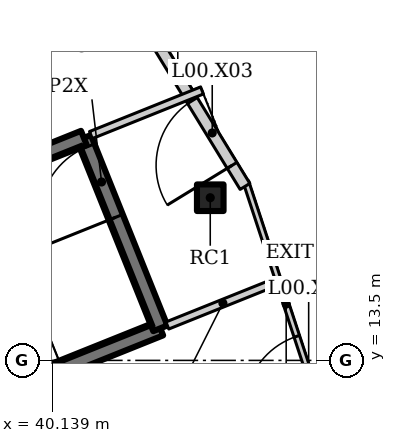
"""IFC4 building model, lengths in metres.
Left out: names, types, materials, properties, quantities, classifications, styles, units other than length and angle.
Written with IfcOpenShell. Run it as: python <this file> out.ifc"""

import sys

from ifc_helpers import new_model, si_unit, direction, frame, frame_2d, origin, origin_2d, place, context, subcontext, project, spatial, rectangle, hollow_rectangle, extrude, element, fill, save


model = new_model("IFC4")
c1 = context("Model", 3, precision=1e-05, world=origin(), true_north=direction((0.0, 1.0)))
c2 = subcontext(c1, "Body", "Model", "MODEL_VIEW")
j1 = project(units=[si_unit("LENGTHUNIT", "METRE"), si_unit("PLANEANGLEUNIT", "RADIAN")], contexts=[c1])
p1 = place(None, origin())
s1 = spatial("IfcSite", under=j1, at=p1, CompositionType="ELEMENT")
p2 = place(p1, origin())
s2 = spatial("IfcBuilding", under=s1, at=p2, CompositionType="ELEMENT")
p3 = place(p2, origin())
s3 = spatial("IfcBuildingStorey", under=s2, at=p3, CompositionType="ELEMENT", Elevation=0.0)
p4 = place(p3, frame((44.292, 17.781, 0.0), z_axis=(0.0, 0.0, 1.0), x_axis=(1.0, 0.0, 0.0)))
e1 = element("IfcColumn", 1, at=p4, inside=s3, PredefinedType="COLUMN", context=c2, shape_type="SweptSolid", body=[
    extrude(hollow_rectangle(XDim=0.7, YDim=0.7, WallThickness=0.04, at=origin_2d()), origin(), (0.0, 0.0, 1.0), 6.5),
])
p5 = place(p3, frame((47.351, 11.759, 0.0), z_axis=(0.0, 0.0, 1.0), x_axis=(-0.312642177535, 0.949870974831, 0.0)))
e2 = element("IfcWall", 2, at=p5, inside=s3, PredefinedType="ELEMENTEDWALL", context=c2, shape_type="SweptSolid", body=[
    extrude(rectangle(XDim=6.786, YDim=0.15, at=frame_2d((3.393, 0.0))), origin(), (0.0, 0.0, 1.0), 6.3),
])
p6 = place(p5, frame((0.5, 0.0, 0.0)))
e3 = element("IfcOpeningElement", 3, at=p6, cuts=e2, PredefinedType="OPENING", context=c2, shape_type="SweptSolid", body=[
    extrude(rectangle(XDim=2.0, YDim=2.4, at=frame_2d((1.0, 1.2))), frame((0.0, 0.085, 0.0), z_axis=(0.0, -1.0, 0.0), x_axis=(1.0, 0.0, 0.0)), (0.0, 0.0, 1.0), 0.17),
])
p7 = place(p3, frame((45.206, 18.078, 0.0), z_axis=(0.0, 0.0, 1.0), x_axis=(-0.52225340952, 0.852790347181, 0.0)))
e4 = element("IfcWall", 4, at=p7, inside=s3, PredefinedType="SOLIDWALL", context=c2, shape_type="SweptSolid", body=[
    extrude(rectangle(XDim=6.771, YDim=0.3, at=frame_2d((3.385, 0.0))), origin(), (0.0, 0.0, 1.0), 6.3),
])
p8 = place(p7, frame((0.65, 0.0, 0.0)))
e5 = element("IfcOpeningElement", 5, at=p8, cuts=e4, PredefinedType="OPENING", context=c2, shape_type="SweptSolid", body=[
    extrude(rectangle(XDim=2.0, YDim=2.1, at=frame_2d((1.0, 1.05))), frame((0.0, 0.16, 0.0), z_axis=(0.0, -1.0, 0.0), x_axis=(1.0, 0.0, 0.0)), (0.0, 0.0, 1.0), 0.32),
])
p9 = place(p3, frame((43.164, 14.418, 0.0), z_axis=(0.0, 0.0, 1.0), x_axis=(0.928010950087, 0.372552917744, 0.0)))
e6 = element("IfcWall", 6, at=p9, inside=s3, PredefinedType="SOLIDWALL", context=c2, shape_type="SweptSolid", body=[
    extrude(rectangle(XDim=3.15, YDim=0.2, at=frame_2d((1.575, 0.0))), origin(), (0.0, 0.0, 1.0), 6.3),
])
p10 = place(p3, frame((41.152, 19.43, 0.0), z_axis=(0.0, 0.0, 1.0), x_axis=(0.928037743531, 0.372486169652, 0.0)))
e7 = element("IfcWall", 7, at=p10, inside=s3, PredefinedType="SOLIDWALL", context=c2, shape_type="SweptSolid", body=[
    extrude(rectangle(XDim=3.15, YDim=0.2, at=frame_2d((1.575, 0.0))), origin(), (0.0, 0.0, 1.0), 6.3),
])
p11 = place(p3, frame((34.812, 11.065, 0.0), z_axis=(0.0, 0.0, 1.0), x_axis=(0.92801678004, 0.372538395288, 0.0)))
e8 = element("IfcWall", 8, at=p11, inside=s3, PredefinedType="SHEAR", context=c2, shape_type="SweptSolid", body=[
    extrude(rectangle(XDim=8.8, YDim=0.4, at=frame_2d((4.4, 0.0))), origin(), (0.0, 0.0, 1.0), 6.5),
])
p12 = place(p3, frame((42.978, 14.344, 0.0), z_axis=(0.0, 0.0, 1.0), x_axis=(-0.372544066459, 0.928014503414, 0.0)))
e9 = element("IfcWall", 9, at=p12, inside=s3, PredefinedType="SHEAR", context=c2, shape_type="SweptSolid", body=[
    extrude(rectangle(XDim=5.4, YDim=0.4, at=frame_2d((2.7, 0.0))), origin(), (0.0, 0.0, 1.0), 6.5),
])
p13 = place(p12, frame((3.15, 0.0, 0.0)))
e10 = element("IfcOpeningElement", 10, at=p13, cuts=e9, PredefinedType="OPENING", context=c2, shape_type="SweptSolid", body=[
    extrude(rectangle(XDim=2.0, YDim=2.1, at=frame_2d((1.0, 1.05))), frame((0.0, 0.21, 0.0), z_axis=(0.0, -1.0, 0.0), x_axis=(1.0, 0.0, 0.0)), (0.0, 0.0, 1.0), 0.42),
])
p14 = place(p3, frame((40.967, 19.355, 0.0), z_axis=(0.0, 0.0, 1.0), x_axis=(-0.92801678004, -0.372538395288, 0.0)))
e11 = element("IfcWall", 11, at=p14, inside=s3, PredefinedType="SHEAR", context=c2, shape_type="SweptSolid", body=[
    extrude(rectangle(XDim=8.8, YDim=0.4, at=frame_2d((4.4, 0.0))), origin(), (0.0, 0.0, 1.0), 6.5),
])
p15 = place(p6, origin())
e12 = element("IfcDoor", 12, at=p15, inside=s3, OperationType="DOUBLE_DOOR_DOUBLE_SWING", PredefinedType="DOOR", context=c2, shape_type="SweptSolid", body=[
    extrude(rectangle(XDim=2.0, YDim=2.4, at=frame_2d((1.0, 1.2))), frame((0.0, 0.025, 0.0), z_axis=(0.0, -1.0, 0.0), x_axis=(1.0, 0.0, 0.0)), (0.0, 0.0, 1.0), 0.05),
])
fill(e3, e12)
p16 = place(p8, origin())
e13 = element("IfcDoor", 13, at=p16, inside=s3, OperationType="DOUBLE_DOOR_DOUBLE_SWING", PredefinedType="DOOR", context=c2, shape_type="SweptSolid", body=[
    extrude(rectangle(XDim=2.0, YDim=2.1, at=frame_2d((1.0, 1.05))), frame((0.0, 0.025, 0.0), z_axis=(0.0, -1.0, 0.0), x_axis=(1.0, 0.0, 0.0)), (0.0, 0.0, 1.0), 0.05),
])
fill(e5, e13)
p17 = place(p13, origin())
e14 = element("IfcDoor", 14, at=p17, inside=s3, OperationType="DOUBLE_DOOR_DOUBLE_SWING", PredefinedType="DOOR", context=c2, shape_type="SweptSolid", body=[
    extrude(rectangle(XDim=2.0, YDim=2.1, at=frame_2d((1.0, 1.05))), frame((0.0, 0.025, 0.0), z_axis=(0.0, -1.0, 0.0), x_axis=(1.0, 0.0, 0.0)), (0.0, 0.0, 1.0), 0.05),
])
fill(e10, e14)
save(model, sys.argv[1])
